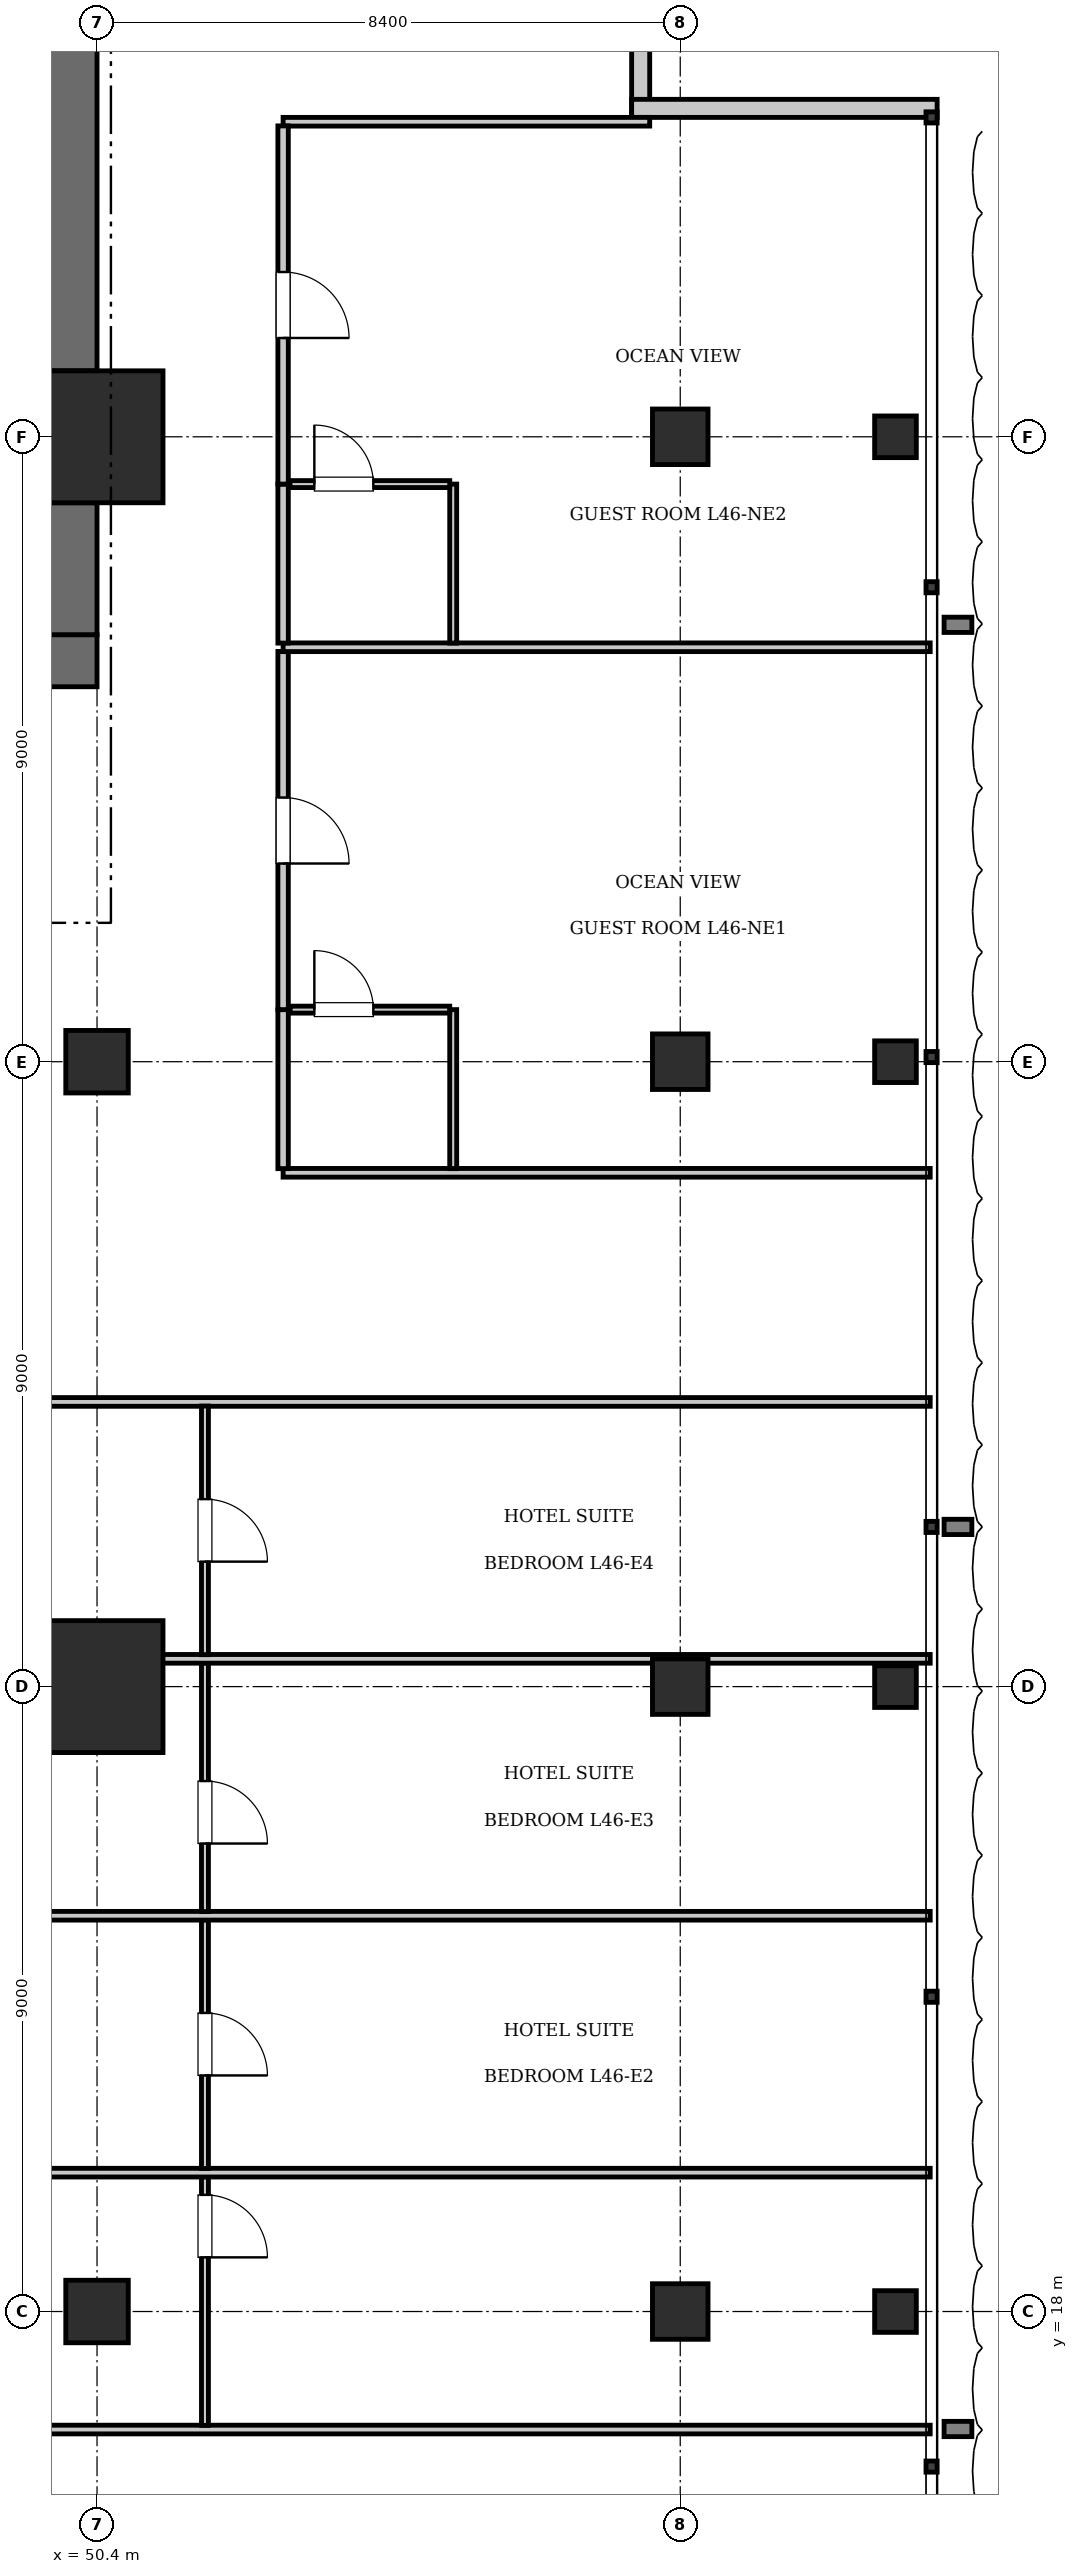
"""IFC4 building model, lengths in metres.
Left out: names, types, materials, properties, quantities, classifications, styles, units other than length and angle.
Written with IfcOpenShell. Run it as: python <this file> out.ifc"""

import sys

from ifc_helpers import new_model, si_unit, direction, frame, frame_2d, origin, origin_2d, place, context, subcontext, project, spatial, rectangle, i_section, extrude, element, fill, save


model = new_model("IFC4")
c1 = context("Model", 3, precision=1e-05, world=origin(), true_north=direction((0.0, 1.0)))
c2 = subcontext(c1, "Body", "Model", "MODEL_VIEW")
j1 = project(units=[si_unit("LENGTHUNIT", "METRE"), si_unit("PLANEANGLEUNIT", "RADIAN")], contexts=[c1])
p1 = place(None, origin())
s1 = spatial("IfcSite", under=j1, at=p1, CompositionType="ELEMENT")
p2 = place(p1, origin())
s2 = spatial("IfcBuilding", under=s1, at=p2, CompositionType="ELEMENT")
p3 = place(p2, frame((0.0, 0.0, 189.0)))
s3 = spatial("IfcBuildingStorey", under=s2, at=p3, CompositionType="ELEMENT", Elevation=189.0)
for number, where, z_axis, x_axis in (
    (1, (50.4, 27.0, 0.0), (0.0, 0.0, 1.0), (1.0, 0.0, 0.0)),
    (2, (50.4, 45.0, 0.0), (0.0, 0.0, 1.0), (1.0, 0.0, 0.0)),
):
    element("IfcColumn", number, at=place(p3, frame(where, z_axis=z_axis, x_axis=x_axis)), inside=s3, PredefinedType="COLUMN", context=c2, shape_type="SweptSolid", body=[
        extrude(rectangle(XDim=1.9, YDim=1.9, at=origin_2d()), origin(), (0.0, 0.0, 1.0), 3.85),
    ])
p4 = place(p3, frame((43.6, 41.775, 0.0), z_axis=(0.0, 0.0, 1.0), x_axis=(1.0, 0.0, 0.0)))
e3 = element("IfcWall", 3, at=p4, inside=s3, PredefinedType="SHEAR", context=c2, shape_type="SweptSolid", body=[
    extrude(rectangle(XDim=6.8, YDim=0.75, at=frame_2d((3.4, 0.0))), origin(), (0.0, 0.0, 1.0), 3.85),
])
p5 = place(p4, frame((3.9, 0.0, 0.0)))
e4 = element("IfcOpeningElement", 4, at=p5, cuts=e3, PredefinedType="OPENING", context=c2, shape_type="SweptSolid", body=[
    extrude(rectangle(XDim=1.15, YDim=2.15, at=frame_2d((0.575, 1.075))), frame((0.0, 0.385, 0.0), z_axis=(0.0, -1.0, 0.0), x_axis=(1.0, 0.0, 0.0)), (0.0, 0.0, 1.0), 0.77),
])
p6 = place(p4, frame((0.55, 0.0, 0.0)))
e5 = element("IfcOpeningElement", 5, at=p6, cuts=e3, PredefinedType="OPENING", context=c2, shape_type="SweptSolid", body=[
    extrude(rectangle(XDim=1.1, YDim=2.2, at=frame_2d((0.55, 1.1))), frame((0.0, 0.385, 0.0), z_axis=(0.0, -1.0, 0.0), x_axis=(1.0, 0.0, 0.0)), (0.0, 0.0, 1.0), 0.77),
])
p7 = place(p3, frame((50.025, 42.15, 0.0), z_axis=(0.0, 0.0, 1.0), x_axis=(0.0, 1.0, 0.0)))
e6 = element("IfcWall", 6, at=p7, inside=s3, PredefinedType="SHEAR", context=c2, shape_type="SweptSolid", body=[
    extrude(rectangle(XDim=1.9, YDim=0.75, at=frame_2d((0.95, 0.0))), origin(), (0.0, 0.0, 1.0), 3.85),
])
p8 = place(p3, frame((50.025, 45.95, 0.0), z_axis=(0.0, 0.0, 1.0), x_axis=(0.0, 1.0, 0.0)))
e7 = element("IfcWall", 7, at=p8, inside=s3, PredefinedType="SHEAR", context=c2, shape_type="SweptSolid", body=[
    extrude(rectangle(XDim=7.3, YDim=0.75, at=frame_2d((3.65, 0.0))), origin(), (0.0, 0.0, 1.0), 3.85),
])
for number, where, z_axis, x_axis in (
    (8, (50.4, 36.0, 0.0), (0.0, 0.0, 1.0), (1.0, 0.0, 0.0)),
    (9, (50.4, 18.0, 0.0), (0.0, 0.0, 1.0), (1.0, 0.0, 0.0)),
):
    element("IfcColumn", number, at=place(p3, frame(where, z_axis=z_axis, x_axis=x_axis)), inside=s3, PredefinedType="COLUMN", context=c2, shape_type="SweptSolid", body=[
        extrude(rectangle(XDim=0.9, YDim=0.9, at=origin_2d()), origin(), (0.0, 0.0, 1.0), 3.85),
    ])
for number, where, z_axis, x_axis in (
    (10, (58.8, 18.0, 0.0), (0.0, 0.0, 1.0), (1.0, 0.0, 0.0)),
    (11, (58.8, 27.0, 0.0), (0.0, 0.0, 1.0), (1.0, 0.0, 0.0)),
    (12, (58.8, 36.0, 0.0), (0.0, 0.0, 1.0), (1.0, 0.0, 0.0)),
    (13, (58.8, 45.0, 0.0), (0.0, 0.0, 1.0), (1.0, 0.0, 0.0)),
):
    element("IfcColumn", number, at=place(p3, frame(where, z_axis=z_axis, x_axis=x_axis)), inside=s3, PredefinedType="COLUMN", context=c2, shape_type="SweptSolid", body=[
        extrude(rectangle(XDim=0.8, YDim=0.8, at=origin_2d()), origin(), (0.0, 0.0, 1.0), 3.85),
    ])
for number, where, z_axis, x_axis in (
    (14, (61.9, 18.0, 0.0), (0.0, 0.0, 1.0), (1.0, 0.0, 0.0)),
    (15, (61.9, 27.0, 0.0), (0.0, 0.0, 1.0), (1.0, 0.0, 0.0)),
    (16, (61.9, 36.0, 0.0), (0.0, 0.0, 1.0), (1.0, 0.0, 0.0)),
    (17, (61.9, 45.0, 0.0), (0.0, 0.0, 1.0), (1.0, 0.0, 0.0)),
):
    element("IfcColumn", number, at=place(p3, frame(where, z_axis=z_axis, x_axis=x_axis)), inside=s3, PredefinedType="COLUMN", context=c2, shape_type="SweptSolid", body=[
        extrude(i_section(OverallWidth=0.6, OverallDepth=0.6, WebThickness=0.025, FlangeThickness=0.038, at=origin_2d()), origin(), (0.0, 0.0, 1.0), 3.85),
    ])
for number, where, z_axis, x_axis in (
    (18, (58.23, 54.0, 0.0), (0.0, 0.0, 1.0), (0.0, -1.0, 0.0)),
    (19, (58.1, 49.73, 0.0), (0.0, 0.0, 1.0), (1.0, 0.0, 0.0)),
):
    element("IfcWall", number, at=place(p3, frame(where, z_axis=z_axis, x_axis=x_axis)), inside=s3, PredefinedType="SOLIDWALL", context=c2, shape_type="SweptSolid", body=[
        extrude(rectangle(XDim=4.4, YDim=0.26, at=frame_2d((2.2, 0.0))), origin(), (0.0, 0.0, 1.0), 3.61),
    ])
for number, where, z_axis, x_axis in (
    (20, (38.08, 16.3, 0.0), (0.0, 0.0, 1.0), (1.0, 0.0, 0.0)),
    (21, (38.08, 31.1, 0.0), (0.0, 0.0, 1.0), (1.0, 0.0, 0.0)),
):
    element("IfcWall", number, at=place(p3, frame(where, z_axis=z_axis, x_axis=x_axis)), inside=s3, PredefinedType="PARTITIONING", context=c2, shape_type="SweptSolid", body=[
        extrude(rectangle(XDim=24.32, YDim=0.125, at=frame_2d((12.16, 0.0))), origin(), (0.0, 0.0, 1.0), 3.61),
    ])
p9 = place(p3, frame((51.954, 16.36, 0.0), z_axis=(0.0, 0.0, 1.0), x_axis=(0.0, 1.0, 0.0)))
e22 = element("IfcWall", 22, at=p9, inside=s3, PredefinedType="PARTITIONING", context=c2, shape_type="SweptSolid", body=[
    extrude(rectangle(XDim=3.58, YDim=0.1, at=frame_2d((1.79, 0.0))), origin(), (0.0, 0.0, 1.0), 3.61),
])
p10 = place(p9, frame((2.42, 0.0, 0.0)))
e23 = element("IfcOpeningElement", 23, at=p10, cuts=e22, PredefinedType="OPENING", context=c2, shape_type="SweptSolid", body=[
    extrude(rectangle(XDim=0.9, YDim=2.1, at=frame_2d((0.45, 1.05))), frame((0.0, 0.06, 0.0), z_axis=(0.0, -1.0, 0.0), x_axis=(1.0, 0.0, 0.0)), (0.0, 0.0, 1.0), 0.12),
])
p11 = place(p3, frame((38.08, 20.0, 0.0), z_axis=(0.0, 0.0, 1.0), x_axis=(1.0, 0.0, 0.0)))
e24 = element("IfcWall", 24, at=p11, inside=s3, PredefinedType="PARTITIONING", context=c2, shape_type="SweptSolid", body=[
    extrude(rectangle(XDim=24.32, YDim=0.125, at=frame_2d((12.16, 0.0))), origin(), (0.0, 0.0, 1.0), 3.61),
])
p12 = place(p3, frame((51.954, 20.06, 0.0), z_axis=(0.0, 0.0, 1.0), x_axis=(0.0, 1.0, 0.0)))
e25 = element("IfcWall", 25, at=p12, inside=s3, PredefinedType="PARTITIONING", context=c2, shape_type="SweptSolid", body=[
    extrude(rectangle(XDim=3.58, YDim=0.1, at=frame_2d((1.79, 0.0))), origin(), (0.0, 0.0, 1.0), 3.61),
])
p13 = place(p12, frame((1.34, 0.0, 0.0)))
e26 = element("IfcOpeningElement", 26, at=p13, cuts=e25, PredefinedType="OPENING", context=c2, shape_type="SweptSolid", body=[
    extrude(rectangle(XDim=0.9, YDim=2.1, at=frame_2d((0.45, 1.05))), frame((0.0, 0.06, 0.0), z_axis=(0.0, -1.0, 0.0), x_axis=(1.0, 0.0, 0.0)), (0.0, 0.0, 1.0), 0.12),
])
p14 = place(p3, frame((38.08, 23.7, 0.0), z_axis=(0.0, 0.0, 1.0), x_axis=(1.0, 0.0, 0.0)))
e27 = element("IfcWall", 27, at=p14, inside=s3, PredefinedType="PARTITIONING", context=c2, shape_type="SweptSolid", body=[
    extrude(rectangle(XDim=24.32, YDim=0.125, at=frame_2d((12.16, 0.0))), origin(), (0.0, 0.0, 1.0), 3.61),
])
p15 = place(p3, frame((51.954, 23.76, 0.0), z_axis=(0.0, 0.0, 1.0), x_axis=(0.0, 1.0, 0.0)))
e28 = element("IfcWall", 28, at=p15, inside=s3, PredefinedType="PARTITIONING", context=c2, shape_type="SweptSolid", body=[
    extrude(rectangle(XDim=3.58, YDim=0.1, at=frame_2d((1.79, 0.0))), origin(), (0.0, 0.0, 1.0), 3.61),
])
p16 = place(p15, frame((0.98, 0.0, 0.0)))
e29 = element("IfcOpeningElement", 29, at=p16, cuts=e28, PredefinedType="OPENING", context=c2, shape_type="SweptSolid", body=[
    extrude(rectangle(XDim=0.9, YDim=2.1, at=frame_2d((0.45, 1.05))), frame((0.0, 0.06, 0.0), z_axis=(0.0, -1.0, 0.0), x_axis=(1.0, 0.0, 0.0)), (0.0, 0.0, 1.0), 0.12),
])
p17 = place(p3, frame((38.08, 27.4, 0.0), z_axis=(0.0, 0.0, 1.0), x_axis=(1.0, 0.0, 0.0)))
e30 = element("IfcWall", 30, at=p17, inside=s3, PredefinedType="PARTITIONING", context=c2, shape_type="SweptSolid", body=[
    extrude(rectangle(XDim=24.32, YDim=0.125, at=frame_2d((12.16, 0.0))), origin(), (0.0, 0.0, 1.0), 3.61),
])
p18 = place(p3, frame((51.954, 27.46, 0.0), z_axis=(0.0, 0.0, 1.0), x_axis=(0.0, 1.0, 0.0)))
e31 = element("IfcWall", 31, at=p18, inside=s3, PredefinedType="PARTITIONING", context=c2, shape_type="SweptSolid", body=[
    extrude(rectangle(XDim=3.58, YDim=0.1, at=frame_2d((1.79, 0.0))), origin(), (0.0, 0.0, 1.0), 3.61),
])
p19 = place(p18, frame((1.34, 0.0, 0.0)))
e32 = element("IfcOpeningElement", 32, at=p19, cuts=e31, PredefinedType="OPENING", context=c2, shape_type="SweptSolid", body=[
    extrude(rectangle(XDim=0.9, YDim=2.1, at=frame_2d((0.45, 1.05))), frame((0.0, 0.06, 0.0), z_axis=(0.0, -1.0, 0.0), x_axis=(1.0, 0.0, 0.0)), (0.0, 0.0, 1.0), 0.12),
])
p20 = place(p3, frame((53.08, 34.4, 0.0), z_axis=(0.0, 0.0, 1.0), x_axis=(1.0, 0.0, 0.0)))
e33 = element("IfcWall", 33, at=p20, inside=s3, PredefinedType="PARTITIONING", context=c2, shape_type="SweptSolid", body=[
    extrude(rectangle(XDim=9.32, YDim=0.125, at=frame_2d((4.66, 0.0))), origin(), (0.0, 0.0, 1.0), 3.61),
])
p21 = place(p3, frame((53.08, 49.538, 0.0), z_axis=(0.0, 0.0, 1.0), x_axis=(1.0, 0.0, 0.0)))
e34 = element("IfcWall", 34, at=p21, inside=s3, PredefinedType="PARTITIONING", context=c2, shape_type="SweptSolid", body=[
    extrude(rectangle(XDim=5.28, YDim=0.125, at=frame_2d((2.64, 0.0))), origin(), (0.0, 0.0, 1.0), 3.61),
])
p22 = place(p3, frame((53.08, 34.46, 0.0), z_axis=(0.0, 0.0, 1.0), x_axis=(0.0, 1.0, 0.0)))
e35 = element("IfcWall", 35, at=p22, inside=s3, PredefinedType="PARTITIONING", context=c2, shape_type="SweptSolid", body=[
    extrude(rectangle(XDim=2.29, YDim=0.15, at=frame_2d((1.145, 0.0))), origin(), (0.0, 0.0, 1.0), 3.61),
])
p23 = place(p3, frame((53.08, 36.75, 0.0), z_axis=(0.0, 0.0, 1.0), x_axis=(0.0, 1.0, 0.0)))
e36 = element("IfcWall", 36, at=p23, inside=s3, PredefinedType="PARTITIONING", context=c2, shape_type="SweptSolid", body=[
    extrude(rectangle(XDim=5.159, YDim=0.15, at=frame_2d((2.579, 0.0))), origin(), (0.0, 0.0, 1.0), 3.61),
])
p24 = place(p23, frame((2.104, 0.0, 0.0)))
e37 = element("IfcOpeningElement", 37, at=p24, cuts=e36, PredefinedType="OPENING", context=c2, shape_type="SweptSolid", body=[
    extrude(rectangle(XDim=0.95, YDim=2.15, at=frame_2d((0.475, 1.075))), frame((0.0, 0.085, 0.0), z_axis=(0.0, -1.0, 0.0), x_axis=(1.0, 0.0, 0.0)), (0.0, 0.0, 1.0), 0.17),
])
p25 = place(p3, frame((55.53, 34.46, 0.0), z_axis=(0.0, 0.0, 1.0), x_axis=(0.0, 1.0, 0.0)))
e38 = element("IfcWall", 38, at=p25, inside=s3, PredefinedType="PARTITIONING", context=c2, shape_type="SweptSolid", body=[
    extrude(rectangle(XDim=2.29, YDim=0.1, at=frame_2d((1.145, 0.0))), origin(), (0.0, 0.0, 1.0), 3.61),
])
p26 = place(p3, frame((53.18, 36.75, 0.0), z_axis=(0.0, 0.0, 1.0), x_axis=(1.0, 0.0, 0.0)))
e39 = element("IfcWall", 39, at=p26, inside=s3, PredefinedType="PARTITIONING", context=c2, shape_type="SweptSolid", body=[
    extrude(rectangle(XDim=2.3, YDim=0.1, at=frame_2d((1.15, 0.0))), origin(), (0.0, 0.0, 1.0), 3.61),
])
p27 = place(p26, frame((0.35, 0.0, 0.0)))
e40 = element("IfcOpeningElement", 40, at=p27, cuts=e39, PredefinedType="OPENING", context=c2, shape_type="SweptSolid", body=[
    extrude(rectangle(XDim=0.85, YDim=2.1, at=frame_2d((0.425, 1.05))), frame((0.0, 0.06, 0.0), z_axis=(0.0, -1.0, 0.0), x_axis=(1.0, 0.0, 0.0)), (0.0, 0.0, 1.0), 0.12),
])
p28 = place(p3, frame((53.08, 41.969, 0.0), z_axis=(0.0, 0.0, 1.0), x_axis=(1.0, 0.0, 0.0)))
e41 = element("IfcWall", 41, at=p28, inside=s3, PredefinedType="PARTITIONING", context=c2, shape_type="SweptSolid", body=[
    extrude(rectangle(XDim=9.32, YDim=0.125, at=frame_2d((4.66, 0.0))), origin(), (0.0, 0.0, 1.0), 3.61),
])
p29 = place(p3, frame((53.08, 42.029, 0.0), z_axis=(0.0, 0.0, 1.0), x_axis=(0.0, 1.0, 0.0)))
e42 = element("IfcWall", 42, at=p29, inside=s3, PredefinedType="PARTITIONING", context=c2, shape_type="SweptSolid", body=[
    extrude(rectangle(XDim=2.29, YDim=0.15, at=frame_2d((1.145, 0.0))), origin(), (0.0, 0.0, 1.0), 3.61),
])
p30 = place(p3, frame((53.08, 44.319, 0.0), z_axis=(0.0, 0.0, 1.0), x_axis=(0.0, 1.0, 0.0)))
e43 = element("IfcWall", 43, at=p30, inside=s3, PredefinedType="PARTITIONING", context=c2, shape_type="SweptSolid", body=[
    extrude(rectangle(XDim=5.159, YDim=0.15, at=frame_2d((2.579, 0.0))), origin(), (0.0, 0.0, 1.0), 3.61),
])
p31 = place(p30, frame((2.104, 0.0, 0.0)))
e44 = element("IfcOpeningElement", 44, at=p31, cuts=e43, PredefinedType="OPENING", context=c2, shape_type="SweptSolid", body=[
    extrude(rectangle(XDim=0.95, YDim=2.15, at=frame_2d((0.475, 1.075))), frame((0.0, 0.085, 0.0), z_axis=(0.0, -1.0, 0.0), x_axis=(1.0, 0.0, 0.0)), (0.0, 0.0, 1.0), 0.17),
])
p32 = place(p3, frame((55.53, 42.029, 0.0), z_axis=(0.0, 0.0, 1.0), x_axis=(0.0, 1.0, 0.0)))
e45 = element("IfcWall", 45, at=p32, inside=s3, PredefinedType="PARTITIONING", context=c2, shape_type="SweptSolid", body=[
    extrude(rectangle(XDim=2.29, YDim=0.1, at=frame_2d((1.145, 0.0))), origin(), (0.0, 0.0, 1.0), 3.61),
])
p33 = place(p3, frame((53.18, 44.319, 0.0), z_axis=(0.0, 0.0, 1.0), x_axis=(1.0, 0.0, 0.0)))
e46 = element("IfcWall", 46, at=p33, inside=s3, PredefinedType="PARTITIONING", context=c2, shape_type="SweptSolid", body=[
    extrude(rectangle(XDim=2.3, YDim=0.1, at=frame_2d((1.15, 0.0))), origin(), (0.0, 0.0, 1.0), 3.61),
])
p34 = place(p33, frame((0.35, 0.0, 0.0)))
e47 = element("IfcOpeningElement", 47, at=p34, cuts=e46, PredefinedType="OPENING", context=c2, shape_type="SweptSolid", body=[
    extrude(rectangle(XDim=0.85, YDim=2.1, at=frame_2d((0.425, 1.05))), frame((0.0, 0.06, 0.0), z_axis=(0.0, -1.0, 0.0), x_axis=(1.0, 0.0, 0.0)), (0.0, 0.0, 1.0), 0.12),
])
p35 = place(p10, frame((0.9, 0.0, 0.0), z_axis=(0.0, 0.0, 1.0), x_axis=(-1.0, 0.0, 0.0)))
e48 = element("IfcDoor", 48, at=p35, inside=s3, OperationType="SINGLE_SWING_RIGHT", PredefinedType="DOOR", context=c2, shape_type="SweptSolid", body=[
    extrude(rectangle(XDim=0.9, YDim=2.1, at=frame_2d((0.45, 1.05))), frame((0.0, 0.025, 0.0), z_axis=(0.0, -1.0, 0.0), x_axis=(1.0, 0.0, 0.0)), (0.0, 0.0, 1.0), 0.05),
])
fill(e23, e48)
p36 = place(p13, frame((0.9, 0.0, 0.0), z_axis=(0.0, 0.0, 1.0), x_axis=(-1.0, 0.0, 0.0)))
e49 = element("IfcDoor", 49, at=p36, inside=s3, OperationType="SINGLE_SWING_RIGHT", PredefinedType="DOOR", context=c2, shape_type="SweptSolid", body=[
    extrude(rectangle(XDim=0.9, YDim=2.1, at=frame_2d((0.45, 1.05))), frame((0.0, 0.025, 0.0), z_axis=(0.0, -1.0, 0.0), x_axis=(1.0, 0.0, 0.0)), (0.0, 0.0, 1.0), 0.05),
])
fill(e26, e49)
p37 = place(p16, frame((0.9, 0.0, 0.0), z_axis=(0.0, 0.0, 1.0), x_axis=(-1.0, 0.0, 0.0)))
e50 = element("IfcDoor", 50, at=p37, inside=s3, OperationType="SINGLE_SWING_RIGHT", PredefinedType="DOOR", context=c2, shape_type="SweptSolid", body=[
    extrude(rectangle(XDim=0.9, YDim=2.1, at=frame_2d((0.45, 1.05))), frame((0.0, 0.025, 0.0), z_axis=(0.0, -1.0, 0.0), x_axis=(1.0, 0.0, 0.0)), (0.0, 0.0, 1.0), 0.05),
])
fill(e29, e50)
p38 = place(p19, frame((0.9, 0.0, 0.0), z_axis=(0.0, 0.0, 1.0), x_axis=(-1.0, 0.0, 0.0)))
e51 = element("IfcDoor", 51, at=p38, inside=s3, OperationType="SINGLE_SWING_RIGHT", PredefinedType="DOOR", context=c2, shape_type="SweptSolid", body=[
    extrude(rectangle(XDim=0.9, YDim=2.1, at=frame_2d((0.45, 1.05))), frame((0.0, 0.025, 0.0), z_axis=(0.0, -1.0, 0.0), x_axis=(1.0, 0.0, 0.0)), (0.0, 0.0, 1.0), 0.05),
])
fill(e32, e51)
p39 = place(p27, origin())
e52 = element("IfcDoor", 52, at=p39, inside=s3, OperationType="SINGLE_SWING_LEFT", PredefinedType="DOOR", context=c2, shape_type="SweptSolid", body=[
    extrude(rectangle(XDim=0.85, YDim=2.1, at=frame_2d((0.425, 1.05))), frame((0.0, 0.025, 0.0), z_axis=(0.0, -1.0, 0.0), x_axis=(1.0, 0.0, 0.0)), (0.0, 0.0, 1.0), 0.05),
])
fill(e40, e52)
p40 = place(p24, frame((0.95, 0.0, 0.0), z_axis=(0.0, 0.0, 1.0), x_axis=(-1.0, 0.0, 0.0)))
e53 = element("IfcDoor", 53, at=p40, inside=s3, OperationType="SINGLE_SWING_RIGHT", PredefinedType="DOOR", context=c2, shape_type="SweptSolid", body=[
    extrude(rectangle(XDim=0.95, YDim=2.15, at=frame_2d((0.475, 1.075))), frame((0.0, 0.025, 0.0), z_axis=(0.0, -1.0, 0.0), x_axis=(1.0, 0.0, 0.0)), (0.0, 0.0, 1.0), 0.05),
])
fill(e37, e53)
p41 = place(p34, origin())
e54 = element("IfcDoor", 54, at=p41, inside=s3, OperationType="SINGLE_SWING_LEFT", PredefinedType="DOOR", context=c2, shape_type="SweptSolid", body=[
    extrude(rectangle(XDim=0.85, YDim=2.1, at=frame_2d((0.425, 1.05))), frame((0.0, 0.025, 0.0), z_axis=(0.0, -1.0, 0.0), x_axis=(1.0, 0.0, 0.0)), (0.0, 0.0, 1.0), 0.05),
])
fill(e47, e54)
p42 = place(p31, frame((0.95, 0.0, 0.0), z_axis=(0.0, 0.0, 1.0), x_axis=(-1.0, 0.0, 0.0)))
e55 = element("IfcDoor", 55, at=p42, inside=s3, OperationType="SINGLE_SWING_RIGHT", PredefinedType="DOOR", context=c2, shape_type="SweptSolid", body=[
    extrude(rectangle(XDim=0.95, YDim=2.15, at=frame_2d((0.475, 1.075))), frame((0.0, 0.025, 0.0), z_axis=(0.0, -1.0, 0.0), x_axis=(1.0, 0.0, 0.0)), (0.0, 0.0, 1.0), 0.05),
])
fill(e44, e55)
save(model, sys.argv[1])
